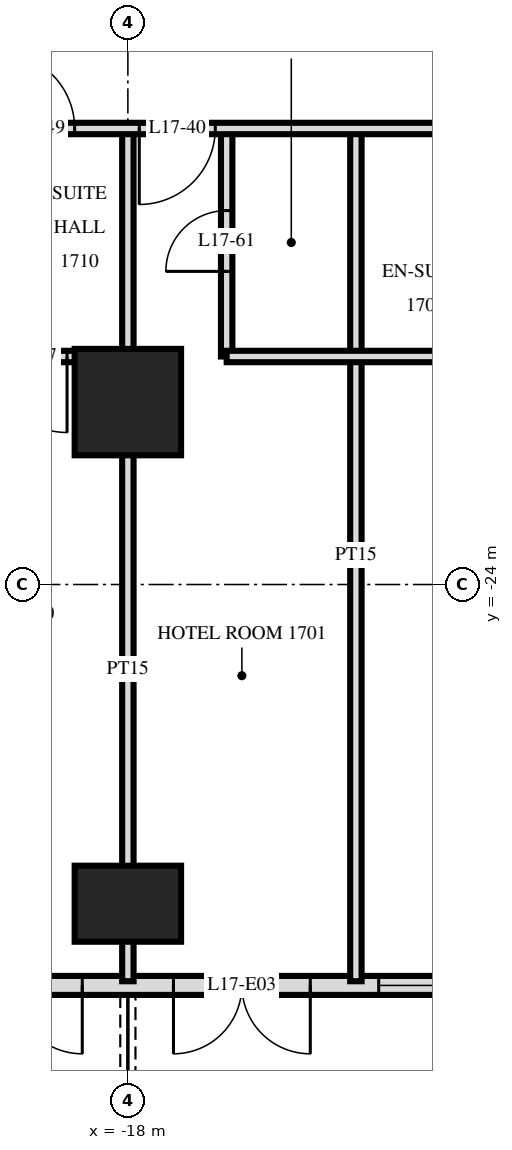
"""IFC4 building model, lengths in metres.
Left out: names, types, materials, properties, quantities, classifications, styles, units other than length and angle.
Written with IfcOpenShell. Run it as: python <this file> out.ifc"""

import sys

from ifc_helpers import new_model, si_unit, direction, frame, frame_2d, origin, origin_2d, place, context, subcontext, project, spatial, rectangle, extrude, element, fill, save


model = new_model("IFC4")
c1 = context("Model", 3, precision=1e-05, world=origin(), true_north=direction((0.0, 1.0)))
c2 = subcontext(c1, "Body", "Model", "MODEL_VIEW")
j1 = project(units=[si_unit("LENGTHUNIT", "METRE"), si_unit("PLANEANGLEUNIT", "RADIAN")], contexts=[c1])
p1 = place(None, origin())
s1 = spatial("IfcSite", under=j1, at=p1, CompositionType="ELEMENT")
p2 = place(p1, origin())
s2 = spatial("IfcBuilding", under=s1, at=p2, CompositionType="ELEMENT")
p3 = place(p2, frame((0.0, 0.0, 70.8)))
s3 = spatial("IfcBuildingStorey", under=s2, at=p3, CompositionType="ELEMENT", Elevation=70.8)
p4 = place(p3, frame((-18.0, -28.2, 0.0), z_axis=(0.0, 0.0, 1.0), x_axis=(1.0, 0.0, 0.0)))
e1 = element("IfcColumn", 1, at=p4, inside=s3, PredefinedType="COLUMN", context=c2, shape_type="SweptSolid", body=[
    extrude(rectangle(XDim=1.4, YDim=1.0, at=origin_2d()), origin(), (0.0, 0.0, 1.0), 3.6),
])
p5 = place(p3, frame((-18.0, -21.6, 0.0), z_axis=(0.0, 0.0, 1.0), x_axis=(1.0, 0.0, 0.0)))
e2 = element("IfcColumn", 2, at=p5, inside=s3, PredefinedType="COLUMN", context=c2, shape_type="SweptSolid", body=[
    extrude(rectangle(XDim=1.4, YDim=1.4, at=origin_2d()), origin(), (0.0, 0.0, 1.0), 3.6),
])
p6 = place(p3, frame((-28.775, -29.275, 0.0), z_axis=(0.0, 0.0, 1.0), x_axis=(1.0, 0.0, 0.0)))
e3 = element("IfcWall", 3, at=p6, inside=s3, PredefinedType="SOLIDWALL", context=c2, shape_type="SweptSolid", body=[
    extrude(rectangle(XDim=57.551, YDim=0.25, at=frame_2d((28.775, 0.0))), origin(), (0.0, 0.0, 1.0), 3.32),
])
p7 = place(p6, frame((0.575, 0.0, 0.0)))
e4 = element("IfcOpeningElement", 4, at=p7, cuts=e3, PredefinedType="OPENING", context=c2, shape_type="SweptSolid", body=[
    extrude(rectangle(XDim=1.8, YDim=2.4, at=frame_2d((0.9, 1.2))), frame((0.0, 0.135, 0.0), z_axis=(0.0, -1.0, 0.0), x_axis=(1.0, 0.0, 0.0)), (0.0, 0.0, 1.0), 0.27),
])
p8 = place(p6, frame((5.075, 0.0, 0.3)))
e5 = element("IfcOpeningElement", 5, at=p8, cuts=e3, PredefinedType="OPENING", context=c2, shape_type="SweptSolid", body=[
    extrude(rectangle(XDim=2.4, YDim=2.1, at=frame_2d((1.2, 1.05))), frame((0.0, 0.135, 0.0), z_axis=(0.0, -1.0, 0.0), x_axis=(1.0, 0.0, 0.0)), (0.0, 0.0, 1.0), 0.27),
])
p9 = place(p6, frame((8.375, 0.0, 0.0)))
e6 = element("IfcOpeningElement", 6, at=p9, cuts=e3, PredefinedType="OPENING", context=c2, shape_type="SweptSolid", body=[
    extrude(rectangle(XDim=1.8, YDim=2.4, at=frame_2d((0.9, 1.2))), frame((0.0, 0.135, 0.0), z_axis=(0.0, -1.0, 0.0), x_axis=(1.0, 0.0, 0.0)), (0.0, 0.0, 1.0), 0.27),
])
p10 = place(p6, frame((11.375, 0.0, 0.0)))
e7 = element("IfcOpeningElement", 7, at=p10, cuts=e3, PredefinedType="OPENING", context=c2, shape_type="SweptSolid", body=[
    extrude(rectangle(XDim=1.8, YDim=2.4, at=frame_2d((0.9, 1.2))), frame((0.0, 0.135, 0.0), z_axis=(0.0, -1.0, 0.0), x_axis=(1.0, 0.0, 0.0)), (0.0, 0.0, 1.0), 0.27),
])
p11 = place(p6, frame((14.075, 0.0, 0.3)))
e8 = element("IfcOpeningElement", 8, at=p11, cuts=e3, PredefinedType="OPENING", context=c2, shape_type="SweptSolid", body=[
    extrude(rectangle(XDim=2.4, YDim=2.1, at=frame_2d((1.2, 1.05))), frame((0.0, 0.135, 0.0), z_axis=(0.0, -1.0, 0.0), x_axis=(1.0, 0.0, 0.0)), (0.0, 0.0, 1.0), 0.27),
])
p12 = place(p6, frame((17.375, 0.0, 0.0)))
e9 = element("IfcOpeningElement", 9, at=p12, cuts=e3, PredefinedType="OPENING", context=c2, shape_type="SweptSolid", body=[
    extrude(rectangle(XDim=1.8, YDim=2.4, at=frame_2d((0.9, 1.2))), frame((0.0, 0.135, 0.0), z_axis=(0.0, -1.0, 0.0), x_axis=(1.0, 0.0, 0.0)), (0.0, 0.0, 1.0), 0.27),
])
p13 = place(p6, frame((20.075, 0.0, 0.3)))
e10 = element("IfcOpeningElement", 10, at=p13, cuts=e3, PredefinedType="OPENING", context=c2, shape_type="SweptSolid", body=[
    extrude(rectangle(XDim=2.4, YDim=2.1, at=frame_2d((1.2, 1.05))), frame((0.0, 0.135, 0.0), z_axis=(0.0, -1.0, 0.0), x_axis=(1.0, 0.0, 0.0)), (0.0, 0.0, 1.0), 0.27),
])
p14 = place(p6, frame((23.075, 0.0, 0.3)))
e11 = element("IfcOpeningElement", 11, at=p14, cuts=e3, PredefinedType="OPENING", context=c2, shape_type="SweptSolid", body=[
    extrude(rectangle(XDim=2.4, YDim=2.1, at=frame_2d((1.2, 1.05))), frame((0.0, 0.135, 0.0), z_axis=(0.0, -1.0, 0.0), x_axis=(1.0, 0.0, 0.0)), (0.0, 0.0, 1.0), 0.27),
])
p15 = place(p6, frame((26.375, 0.0, 0.0)))
e12 = element("IfcOpeningElement", 12, at=p15, cuts=e3, PredefinedType="OPENING", context=c2, shape_type="SweptSolid", body=[
    extrude(rectangle(XDim=1.8, YDim=2.4, at=frame_2d((0.9, 1.2))), frame((0.0, 0.135, 0.0), z_axis=(0.0, -1.0, 0.0), x_axis=(1.0, 0.0, 0.0)), (0.0, 0.0, 1.0), 0.27),
])
p16 = place(p6, frame((29.375, 0.0, 0.0)))
e13 = element("IfcOpeningElement", 13, at=p16, cuts=e3, PredefinedType="OPENING", context=c2, shape_type="SweptSolid", body=[
    extrude(rectangle(XDim=1.8, YDim=2.4, at=frame_2d((0.9, 1.2))), frame((0.0, 0.135, 0.0), z_axis=(0.0, -1.0, 0.0), x_axis=(1.0, 0.0, 0.0)), (0.0, 0.0, 1.0), 0.27),
])
p17 = place(p6, frame((32.075, 0.0, 0.3)))
e14 = element("IfcOpeningElement", 14, at=p17, cuts=e3, PredefinedType="OPENING", context=c2, shape_type="SweptSolid", body=[
    extrude(rectangle(XDim=2.4, YDim=2.1, at=frame_2d((1.2, 1.05))), frame((0.0, 0.135, 0.0), z_axis=(0.0, -1.0, 0.0), x_axis=(1.0, 0.0, 0.0)), (0.0, 0.0, 1.0), 0.27),
])
p18 = place(p6, frame((35.375, 0.0, 0.0)))
e15 = element("IfcOpeningElement", 15, at=p18, cuts=e3, PredefinedType="OPENING", context=c2, shape_type="SweptSolid", body=[
    extrude(rectangle(XDim=1.8, YDim=2.4, at=frame_2d((0.9, 1.2))), frame((0.0, 0.135, 0.0), z_axis=(0.0, -1.0, 0.0), x_axis=(1.0, 0.0, 0.0)), (0.0, 0.0, 1.0), 0.27),
])
p19 = place(p6, frame((38.075, 0.0, 0.3)))
e16 = element("IfcOpeningElement", 16, at=p19, cuts=e3, PredefinedType="OPENING", context=c2, shape_type="SweptSolid", body=[
    extrude(rectangle(XDim=2.4, YDim=2.1, at=frame_2d((1.2, 1.05))), frame((0.0, 0.135, 0.0), z_axis=(0.0, -1.0, 0.0), x_axis=(1.0, 0.0, 0.0)), (0.0, 0.0, 1.0), 0.27),
])
p20 = place(p6, frame((41.075, 0.0, 0.3)))
e17 = element("IfcOpeningElement", 17, at=p20, cuts=e3, PredefinedType="OPENING", context=c2, shape_type="SweptSolid", body=[
    extrude(rectangle(XDim=2.4, YDim=2.1, at=frame_2d((1.2, 1.05))), frame((0.0, 0.135, 0.0), z_axis=(0.0, -1.0, 0.0), x_axis=(1.0, 0.0, 0.0)), (0.0, 0.0, 1.0), 0.27),
])
p21 = place(p6, frame((44.375, 0.0, 0.0)))
e18 = element("IfcOpeningElement", 18, at=p21, cuts=e3, PredefinedType="OPENING", context=c2, shape_type="SweptSolid", body=[
    extrude(rectangle(XDim=1.8, YDim=2.4, at=frame_2d((0.9, 1.2))), frame((0.0, 0.135, 0.0), z_axis=(0.0, -1.0, 0.0), x_axis=(1.0, 0.0, 0.0)), (0.0, 0.0, 1.0), 0.27),
])
p22 = place(p6, frame((47.075, 0.0, 0.3)))
e19 = element("IfcOpeningElement", 19, at=p22, cuts=e3, PredefinedType="OPENING", context=c2, shape_type="SweptSolid", body=[
    extrude(rectangle(XDim=2.4, YDim=2.1, at=frame_2d((1.2, 1.05))), frame((0.0, 0.135, 0.0), z_axis=(0.0, -1.0, 0.0), x_axis=(1.0, 0.0, 0.0)), (0.0, 0.0, 1.0), 0.27),
])
p23 = place(p6, frame((50.375, 0.0, 0.0)))
e20 = element("IfcOpeningElement", 20, at=p23, cuts=e3, PredefinedType="OPENING", context=c2, shape_type="SweptSolid", body=[
    extrude(rectangle(XDim=1.8, YDim=2.4, at=frame_2d((0.9, 1.2))), frame((0.0, 0.135, 0.0), z_axis=(0.0, -1.0, 0.0), x_axis=(1.0, 0.0, 0.0)), (0.0, 0.0, 1.0), 0.27),
])
p24 = place(p6, frame((53.375, 0.0, 0.0)))
e21 = element("IfcOpeningElement", 21, at=p24, cuts=e3, PredefinedType="OPENING", context=c2, shape_type="SweptSolid", body=[
    extrude(rectangle(XDim=1.8, YDim=2.4, at=frame_2d((0.9, 1.2))), frame((0.0, 0.135, 0.0), z_axis=(0.0, -1.0, 0.0), x_axis=(1.0, 0.0, 0.0)), (0.0, 0.0, 1.0), 0.27),
])
p25 = place(p3, frame((-15.0, -29.22, 0.0), z_axis=(0.0, 0.0, 1.0), x_axis=(0.0, 1.0, 0.0)))
e22 = element("IfcWall", 22, at=p25, inside=s3, PredefinedType="PARTITIONING", context=c2, shape_type="SweptSolid", body=[
    extrude(rectangle(XDim=11.22, YDim=0.15, at=frame_2d((5.61, 0.0))), origin(), (0.0, 0.0, 1.0), 3.32),
])
p26 = place(p3, frame((-16.7, -21.0, 0.0), z_axis=(0.0, 0.0, 1.0), x_axis=(0.0, 1.0, 0.0)))
e23 = element("IfcWall", 23, at=p26, inside=s3, PredefinedType="PARTITIONING", context=c2, shape_type="SweptSolid", body=[
    extrude(rectangle(XDim=3.0, YDim=0.15, at=frame_2d((1.5, 0.0))), origin(), (0.0, 0.0, 1.0), 3.32),
])
p27 = place(p26, frame((1.12, 0.0, 0.0)))
e24 = element("IfcOpeningElement", 24, at=p27, cuts=e23, PredefinedType="OPENING", context=c2, shape_type="SweptSolid", body=[
    extrude(rectangle(XDim=0.8, YDim=2.1, at=frame_2d((0.4, 1.05))), frame((0.0, 0.085, 0.0), z_axis=(0.0, -1.0, 0.0), x_axis=(1.0, 0.0, 0.0)), (0.0, 0.0, 1.0), 0.17),
])
p28 = place(p3, frame((-18.0, -21.0, 0.0), z_axis=(0.0, 0.0, 1.0), x_axis=(0.0, 1.0, 0.0)))
e25 = element("IfcWall", 25, at=p28, inside=s3, PredefinedType="PARTITIONING", context=c2, shape_type="SweptSolid", body=[
    extrude(rectangle(XDim=3.0, YDim=0.15, at=frame_2d((1.5, 0.0))), origin(), (0.0, 0.0, 1.0), 3.32),
])
p29 = place(p3, frame((-18.0, -29.22, 0.0), z_axis=(0.0, 0.0, 1.0), x_axis=(0.0, 1.0, 0.0)))
e26 = element("IfcWall", 26, at=p29, inside=s3, PredefinedType="PARTITIONING", context=c2, shape_type="SweptSolid", body=[
    extrude(rectangle(XDim=8.22, YDim=0.15, at=frame_2d((4.11, 0.0))), origin(), (0.0, 0.0, 1.0), 3.32),
])
p30 = place(p3, frame((-20.4, -21.0, 0.0), z_axis=(0.0, 0.0, 1.0), x_axis=(1.0, 0.0, 0.0)))
e27 = element("IfcWall", 27, at=p30, inside=s3, PredefinedType="PARTITIONING", context=c2, shape_type="SweptSolid", body=[
    extrude(rectangle(XDim=2.4, YDim=0.15, at=frame_2d((1.2, 0.0))), origin(), (0.0, 0.0, 1.0), 3.32),
])
p31 = place(p30, frame((0.6, 0.0, 0.0)))
e28 = element("IfcOpeningElement", 28, at=p31, cuts=e27, PredefinedType="OPENING", context=c2, shape_type="SweptSolid", body=[
    extrude(rectangle(XDim=1.0, YDim=2.1, at=frame_2d((0.5, 1.05))), frame((0.0, 0.085, 0.0), z_axis=(0.0, -1.0, 0.0), x_axis=(1.0, 0.0, 0.0)), (0.0, 0.0, 1.0), 0.17),
])
p32 = place(p3, frame((-16.7, -21.0, 0.0), z_axis=(0.0, 0.0, 1.0), x_axis=(1.0, 0.0, 0.0)))
e29 = element("IfcWall", 29, at=p32, inside=s3, PredefinedType="PARTITIONING", context=c2, shape_type="SweptSolid", body=[
    extrude(rectangle(XDim=4.4, YDim=0.15, at=frame_2d((2.2, 0.0))), origin(), (0.0, 0.0, 1.0), 3.32),
])
p33 = place(p3, frame((-33.12, -18.0, 0.0), z_axis=(0.0, 0.0, 1.0), x_axis=(1.0, 0.0, 0.0)))
e30 = element("IfcWall", 30, at=p33, inside=s3, PredefinedType="PARTITIONING", context=c2, shape_type="SweptSolid", body=[
    extrude(rectangle(XDim=66.24, YDim=0.15, at=frame_2d((33.12, 0.0))), origin(), (0.0, 0.0, 1.0), 3.32),
])
p34 = place(p33, frame((15.27, 0.0, 0.0)))
e31 = element("IfcOpeningElement", 31, at=p34, cuts=e30, PredefinedType="OPENING", context=c2, shape_type="SweptSolid", body=[
    extrude(rectangle(XDim=1.0, YDim=2.1, at=frame_2d((0.5, 1.05))), frame((0.0, 0.085, 0.0), z_axis=(0.0, -1.0, 0.0), x_axis=(1.0, 0.0, 0.0)), (0.0, 0.0, 1.0), 0.17),
])
p35 = place(p33, frame((21.22, 0.0, 0.0)))
e32 = element("IfcOpeningElement", 32, at=p35, cuts=e30, PredefinedType="OPENING", context=c2, shape_type="SweptSolid", body=[
    extrude(rectangle(XDim=1.0, YDim=2.1, at=frame_2d((0.5, 1.05))), frame((0.0, 0.085, 0.0), z_axis=(0.0, -1.0, 0.0), x_axis=(1.0, 0.0, 0.0)), (0.0, 0.0, 1.0), 0.17),
])
p36 = place(p33, frame((24.27, 0.0, 0.0)))
e33 = element("IfcOpeningElement", 33, at=p36, cuts=e30, PredefinedType="OPENING", context=c2, shape_type="SweptSolid", body=[
    extrude(rectangle(XDim=1.0, YDim=2.1, at=frame_2d((0.5, 1.05))), frame((0.0, 0.085, 0.0), z_axis=(0.0, -1.0, 0.0), x_axis=(1.0, 0.0, 0.0)), (0.0, 0.0, 1.0), 0.17),
])
p37 = place(p33, frame((30.97, 0.0, 0.0)))
e34 = element("IfcOpeningElement", 34, at=p37, cuts=e30, PredefinedType="OPENING", context=c2, shape_type="SweptSolid", body=[
    extrude(rectangle(XDim=1.0, YDim=2.1, at=frame_2d((0.5, 1.05))), frame((0.0, 0.085, 0.0), z_axis=(0.0, -1.0, 0.0), x_axis=(1.0, 0.0, 0.0)), (0.0, 0.0, 1.0), 0.17),
])
p38 = place(p33, frame((40.42, 0.0, 0.0)))
e35 = element("IfcOpeningElement", 35, at=p38, cuts=e30, PredefinedType="OPENING", context=c2, shape_type="SweptSolid", body=[
    extrude(rectangle(XDim=1.0, YDim=2.1, at=frame_2d((0.5, 1.05))), frame((0.0, 0.085, 0.0), z_axis=(0.0, -1.0, 0.0), x_axis=(1.0, 0.0, 0.0)), (0.0, 0.0, 1.0), 0.17),
])
p39 = place(p33, frame((43.97, 0.0, 0.0)))
e36 = element("IfcOpeningElement", 36, at=p39, cuts=e30, PredefinedType="OPENING", context=c2, shape_type="SweptSolid", body=[
    extrude(rectangle(XDim=1.0, YDim=2.1, at=frame_2d((0.5, 1.05))), frame((0.0, 0.085, 0.0), z_axis=(0.0, -1.0, 0.0), x_axis=(1.0, 0.0, 0.0)), (0.0, 0.0, 1.0), 0.17),
])
p40 = place(p33, frame((45.52, 0.0, 0.0)))
e37 = element("IfcOpeningElement", 37, at=p40, cuts=e30, PredefinedType="OPENING", context=c2, shape_type="SweptSolid", body=[
    extrude(rectangle(XDim=1.0, YDim=2.1, at=frame_2d((0.5, 1.05))), frame((0.0, 0.085, 0.0), z_axis=(0.0, -1.0, 0.0), x_axis=(1.0, 0.0, 0.0)), (0.0, 0.0, 1.0), 0.17),
])
p41 = place(p33, frame((52.97, 0.0, 0.0)))
e38 = element("IfcOpeningElement", 38, at=p41, cuts=e30, PredefinedType="OPENING", context=c2, shape_type="SweptSolid", body=[
    extrude(rectangle(XDim=1.0, YDim=2.1, at=frame_2d((0.5, 1.05))), frame((0.0, 0.085, 0.0), z_axis=(0.0, -1.0, 0.0), x_axis=(1.0, 0.0, 0.0)), (0.0, 0.0, 1.0), 0.17),
])
p42 = place(p33, frame((54.27, 0.0, 0.0)))
e39 = element("IfcOpeningElement", 39, at=p42, cuts=e30, PredefinedType="OPENING", context=c2, shape_type="SweptSolid", body=[
    extrude(rectangle(XDim=1.0, YDim=2.1, at=frame_2d((0.5, 1.05))), frame((0.0, 0.085, 0.0), z_axis=(0.0, -1.0, 0.0), x_axis=(1.0, 0.0, 0.0)), (0.0, 0.0, 1.0), 0.17),
])
p43 = place(p33, frame((13.42, 0.0, 0.0)))
e40 = element("IfcOpeningElement", 40, at=p43, cuts=e30, PredefinedType="OPENING", context=c2, shape_type="SweptSolid", body=[
    extrude(rectangle(XDim=1.0, YDim=2.1, at=frame_2d((0.5, 1.05))), frame((0.0, 0.085, 0.0), z_axis=(0.0, -1.0, 0.0), x_axis=(1.0, 0.0, 0.0)), (0.0, 0.0, 1.0), 0.17),
])
p44 = place(p33, frame((60.82, 0.0, 0.0)))
e41 = element("IfcOpeningElement", 41, at=p44, cuts=e30, PredefinedType="OPENING", context=c2, shape_type="SweptSolid", body=[
    extrude(rectangle(XDim=1.0, YDim=2.1, at=frame_2d((0.5, 1.05))), frame((0.0, 0.085, 0.0), z_axis=(0.0, -1.0, 0.0), x_axis=(1.0, 0.0, 0.0)), (0.0, 0.0, 1.0), 0.17),
])
p45 = place(p9, frame((0.9, 0.0, 0.0), z_axis=(0.0, 0.0, 1.0), x_axis=(-1.0, 0.0, 0.0)))
e42 = element("IfcDoor", 42, at=p45, inside=s3, OperationType="DOUBLE_DOOR_SINGLE_SWING", PredefinedType="DOOR", context=c2, shape_type="SweptSolid", body=[
    extrude(rectangle(XDim=1.8, YDim=2.4, at=frame_2d((0.0, 1.2))), frame((0.0, -0.025, 0.0), z_axis=(0.0, 1.0, 0.0), x_axis=(-1.0, 0.0, 0.0)), (0.0, 0.0, 1.0), 0.05),
])
fill(e6, e42)
p46 = place(p10, frame((0.9, 0.0, 0.0), z_axis=(0.0, 0.0, 1.0), x_axis=(-1.0, 0.0, 0.0)))
e43 = element("IfcDoor", 43, at=p46, inside=s3, OperationType="DOUBLE_DOOR_SINGLE_SWING", PredefinedType="DOOR", context=c2, shape_type="SweptSolid", body=[
    extrude(rectangle(XDim=1.8, YDim=2.4, at=frame_2d((0.0, 1.2))), frame((0.0, -0.025, 0.0), z_axis=(0.0, 1.0, 0.0), x_axis=(-1.0, 0.0, 0.0)), (0.0, 0.0, 1.0), 0.05),
])
fill(e7, e43)
p47 = place(p11, origin())
e44 = element("IfcWindow", 44, at=p47, inside=s3, PartitioningType="SINGLE_PANEL", PredefinedType="WINDOW", context=c2, shape_type="SweptSolid", body=[
    extrude(rectangle(XDim=2.4, YDim=2.1, at=frame_2d((1.2, 1.05))), frame((0.0, 0.03, 0.0), z_axis=(0.0, -1.0, 0.0), x_axis=(1.0, 0.0, 0.0)), (0.0, 0.0, 1.0), 0.06),
])
fill(e8, e44)
p48 = place(p34, frame((0.5, 0.0, 0.0), z_axis=(0.0, 0.0, 1.0), x_axis=(-1.0, 0.0, 0.0)))
e45 = element("IfcDoor", 45, at=p48, inside=s3, OperationType="SINGLE_SWING_LEFT", PredefinedType="DOOR", context=c2, shape_type="SweptSolid", body=[
    extrude(rectangle(XDim=1.0, YDim=2.1, at=frame_2d((0.0, 1.05))), frame((0.0, -0.025, 0.0), z_axis=(0.0, 1.0, 0.0), x_axis=(-1.0, 0.0, 0.0)), (0.0, 0.0, 1.0), 0.05),
])
fill(e31, e45)
p49 = place(p43, origin())
e46 = element("IfcDoor", 46, at=p49, inside=s3, OperationType="SINGLE_SWING_RIGHT", PredefinedType="DOOR", context=c2, shape_type="SweptSolid", body=[
    extrude(rectangle(XDim=1.0, YDim=2.1, at=frame_2d((0.5, 1.05))), frame((0.0, 0.025, 0.0), z_axis=(0.0, -1.0, 0.0), x_axis=(1.0, 0.0, 0.0)), (0.0, 0.0, 1.0), 0.05),
])
fill(e40, e46)
p50 = place(p27, origin())
e47 = element("IfcDoor", 47, at=p50, inside=s3, OperationType="SINGLE_SWING_RIGHT", PredefinedType="DOOR", context=c2, shape_type="SweptSolid", body=[
    extrude(rectangle(XDim=0.8, YDim=2.1, at=frame_2d((0.4, 1.05))), frame((0.0, 0.025, 0.0), z_axis=(0.0, -1.0, 0.0), x_axis=(1.0, 0.0, 0.0)), (0.0, 0.0, 1.0), 0.05),
])
fill(e24, e47)
p51 = place(p31, frame((0.5, 0.0, 0.0), z_axis=(0.0, 0.0, 1.0), x_axis=(-1.0, 0.0, 0.0)))
e48 = element("IfcDoor", 48, at=p51, inside=s3, OperationType="SINGLE_SWING_RIGHT", PredefinedType="DOOR", context=c2, shape_type="SweptSolid", body=[
    extrude(rectangle(XDim=1.0, YDim=2.1, at=frame_2d((0.0, 1.05))), frame((0.0, -0.025, 0.0), z_axis=(0.0, 1.0, 0.0), x_axis=(-1.0, 0.0, 0.0)), (0.0, 0.0, 1.0), 0.05),
])
fill(e28, e48)
save(model, sys.argv[1])
